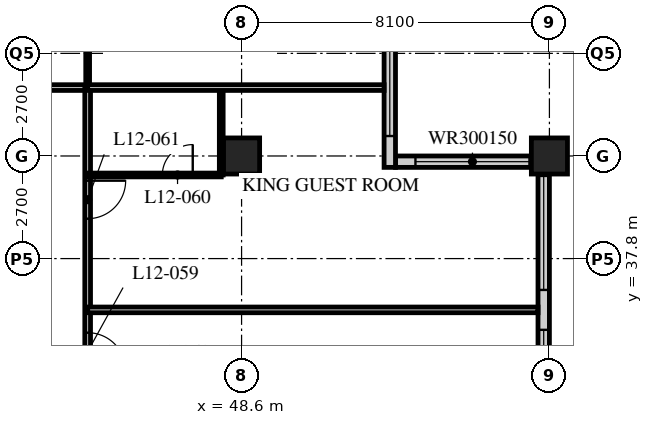
"""IFC4 building model, lengths in metres.
Left out: names, types, materials, properties, quantities, classifications, styles, units other than length and angle.
Written with IfcOpenShell. Run it as: python <this file> out.ifc"""

import sys

from ifc_helpers import new_model, si_unit, direction, frame, frame_2d, origin, origin_2d, place, context, subcontext, project, spatial, rectangle, hollow_rectangle, extrude, element, fill, save


model = new_model("IFC4")
c1 = context("Model", 3, precision=1e-05, world=origin(), true_north=direction((0.0, 1.0)))
c2 = subcontext(c1, "Body", "Model", "MODEL_VIEW")
j1 = project(units=[si_unit("LENGTHUNIT", "METRE"), si_unit("PLANEANGLEUNIT", "RADIAN")], contexts=[c1])
p1 = place(None, origin())
s1 = spatial("IfcSite", under=j1, at=p1, CompositionType="ELEMENT")
p2 = place(p1, origin())
s2 = spatial("IfcBuilding", under=s1, at=p2, CompositionType="ELEMENT")
p3 = place(p2, frame((0.0, 0.0, 53.4)))
s3 = spatial("IfcBuildingStorey", under=s2, at=p3, CompositionType="ELEMENT", Elevation=53.4)
for number, where, z_axis, x_axis in (
    (1, (48.6, 40.5, 0.0), (0.0, 0.0, 1.0), (1.0, 0.0, 0.0)),
    (2, (56.7, 40.5, 0.0), (0.0, 0.0, 1.0), (1.0, 0.0, 0.0)),
):
    element("IfcColumn", number, at=place(p3, frame(where, z_axis=z_axis, x_axis=x_axis)), inside=s3, PredefinedType="COLUMN", context=c2, shape_type="SweptSolid", body=[
        extrude(hollow_rectangle(XDim=0.95, YDim=0.95, WallThickness=0.095, at=origin_2d()), origin(), (0.0, 0.0, 1.0), 3.4),
    ])
p4 = place(p3, frame((56.55, 8.4, 0.0), z_axis=(0.0, 0.0, 1.0), x_axis=(0.0, 1.0, 0.0)))
e3 = element("IfcWall", 3, at=p4, inside=s3, PredefinedType="SOLIDWALL", context=c2, shape_type="SweptSolid", body=[
    extrude(rectangle(XDim=32.1, YDim=0.3, at=frame_2d((16.05, 0.0))), origin(), (0.0, 0.0, 1.0), 3.19),
])
p5 = place(p4, frame((0.225, 0.0, 0.9)))
e4 = element("IfcOpeningElement", 4, at=p5, cuts=e3, PredefinedType="OPENING", context=c2, shape_type="SweptSolid", body=[
    extrude(rectangle(XDim=3.0, YDim=2.0, at=frame_2d((1.5, 1.0))), frame((0.0, 0.16, 0.0), z_axis=(0.0, -1.0, 0.0), x_axis=(1.0, 0.0, 0.0)), (0.0, 0.0, 1.0), 0.32),
])
p6 = place(p4, frame((4.275, 0.0, 0.9)))
e5 = element("IfcOpeningElement", 5, at=p6, cuts=e3, PredefinedType="OPENING", context=c2, shape_type="SweptSolid", body=[
    extrude(rectangle(XDim=3.0, YDim=2.0, at=frame_2d((1.5, 1.0))), frame((0.0, 0.16, 0.0), z_axis=(0.0, -1.0, 0.0), x_axis=(1.0, 0.0, 0.0)), (0.0, 0.0, 1.0), 0.32),
])
p7 = place(p4, frame((8.325, 0.0, 0.9)))
e6 = element("IfcOpeningElement", 6, at=p7, cuts=e3, PredefinedType="OPENING", context=c2, shape_type="SweptSolid", body=[
    extrude(rectangle(XDim=3.0, YDim=2.0, at=frame_2d((1.5, 1.0))), frame((0.0, 0.16, 0.0), z_axis=(0.0, -1.0, 0.0), x_axis=(1.0, 0.0, 0.0)), (0.0, 0.0, 1.0), 0.32),
])
p8 = place(p4, frame((12.375, 0.0, 0.9)))
e7 = element("IfcOpeningElement", 7, at=p8, cuts=e3, PredefinedType="OPENING", context=c2, shape_type="SweptSolid", body=[
    extrude(rectangle(XDim=3.0, YDim=2.0, at=frame_2d((1.5, 1.0))), frame((0.0, 0.16, 0.0), z_axis=(0.0, -1.0, 0.0), x_axis=(1.0, 0.0, 0.0)), (0.0, 0.0, 1.0), 0.32),
])
p9 = place(p4, frame((16.425, 0.0, 0.9)))
e8 = element("IfcOpeningElement", 8, at=p9, cuts=e3, PredefinedType="OPENING", context=c2, shape_type="SweptSolid", body=[
    extrude(rectangle(XDim=3.0, YDim=2.0, at=frame_2d((1.5, 1.0))), frame((0.0, 0.16, 0.0), z_axis=(0.0, -1.0, 0.0), x_axis=(1.0, 0.0, 0.0)), (0.0, 0.0, 1.0), 0.32),
])
p10 = place(p4, frame((20.475, 0.0, 0.9)))
e9 = element("IfcOpeningElement", 9, at=p10, cuts=e3, PredefinedType="OPENING", context=c2, shape_type="SweptSolid", body=[
    extrude(rectangle(XDim=3.0, YDim=2.0, at=frame_2d((1.5, 1.0))), frame((0.0, 0.16, 0.0), z_axis=(0.0, -1.0, 0.0), x_axis=(1.0, 0.0, 0.0)), (0.0, 0.0, 1.0), 0.32),
])
p11 = place(p4, frame((24.525, 0.0, 0.9)))
e10 = element("IfcOpeningElement", 10, at=p11, cuts=e3, PredefinedType="OPENING", context=c2, shape_type="SweptSolid", body=[
    extrude(rectangle(XDim=3.0, YDim=2.0, at=frame_2d((1.5, 1.0))), frame((0.0, 0.16, 0.0), z_axis=(0.0, -1.0, 0.0), x_axis=(1.0, 0.0, 0.0)), (0.0, 0.0, 1.0), 0.32),
])
p12 = place(p4, frame((28.575, 0.0, 0.9)))
e11 = element("IfcOpeningElement", 11, at=p12, cuts=e3, PredefinedType="OPENING", context=c2, shape_type="SweptSolid", body=[
    extrude(rectangle(XDim=3.0, YDim=2.0, at=frame_2d((1.5, 1.0))), frame((0.0, 0.16, 0.0), z_axis=(0.0, -1.0, 0.0), x_axis=(1.0, 0.0, 0.0)), (0.0, 0.0, 1.0), 0.32),
])
p13 = place(p3, frame((56.4, 40.35, 0.0), z_axis=(0.0, 0.0, 1.0), x_axis=(-1.0, 0.0, 0.0)))
e12 = element("IfcWall", 12, at=p13, inside=s3, PredefinedType="SOLIDWALL", context=c2, shape_type="SweptSolid", body=[
    extrude(rectangle(XDim=3.75, YDim=0.3, at=frame_2d((1.875, 0.0))), origin(), (0.0, 0.0, 1.0), 3.19),
])
p14 = place(p13, frame((0.225, 0.0, 0.9)))
e13 = element("IfcOpeningElement", 13, at=p14, cuts=e12, PredefinedType="OPENING", context=c2, shape_type="SweptSolid", body=[
    extrude(rectangle(XDim=3.0, YDim=1.5, at=frame_2d((1.5, 0.75))), frame((0.0, 0.16, 0.0), z_axis=(0.0, -1.0, 0.0), x_axis=(1.0, 0.0, 0.0)), (0.0, 0.0, 1.0), 0.32),
])
p15 = place(p3, frame((52.5, 40.2, 0.0), z_axis=(0.0, 0.0, 1.0), x_axis=(0.0, 1.0, 0.0)))
e14 = element("IfcWall", 14, at=p15, inside=s3, PredefinedType="SOLIDWALL", context=c2, shape_type="SweptSolid", body=[
    extrude(rectangle(XDim=4.35, YDim=0.3, at=frame_2d((2.175, 0.0))), origin(), (0.0, 0.0, 1.0), 3.19),
])
p16 = place(p15, frame((0.825, 0.0, 0.9)))
e15 = element("IfcOpeningElement", 15, at=p16, cuts=e14, PredefinedType="OPENING", context=c2, shape_type="SweptSolid", body=[
    extrude(rectangle(XDim=3.0, YDim=1.5, at=frame_2d((1.5, 0.75))), frame((0.0, 0.16, 0.0), z_axis=(0.0, -1.0, 0.0), x_axis=(1.0, 0.0, 0.0)), (0.0, 0.0, 1.0), 0.32),
])
p17 = place(p3, frame((12.15, 42.3, 0.0), z_axis=(0.0, 0.0, 1.0), x_axis=(1.0, 0.0, 0.0)))
e16 = element("IfcWall", 16, at=p17, inside=s3, PredefinedType="PARTITIONING", context=c2, shape_type="SweptSolid", body=[
    extrude(rectangle(XDim=32.4, YDim=0.15, at=frame_2d((16.2, 0.0))), origin(), (0.0, 0.0, 1.0), 3.19),
])
p18 = place(p17, frame((6.5, 0.0, 0.0)))
e17 = element("IfcOpeningElement", 17, at=p18, cuts=e16, PredefinedType="OPENING", context=c2, shape_type="SweptSolid", body=[
    extrude(rectangle(XDim=1.0, YDim=2.1, at=frame_2d((0.5, 1.05))), frame((0.0, 0.085, 0.0), z_axis=(0.0, -1.0, 0.0), x_axis=(1.0, 0.0, 0.0)), (0.0, 0.0, 1.0), 0.17),
])
p19 = place(p17, frame((10.55, 0.0, 0.0)))
e18 = element("IfcOpeningElement", 18, at=p19, cuts=e16, PredefinedType="OPENING", context=c2, shape_type="SweptSolid", body=[
    extrude(rectangle(XDim=1.0, YDim=2.1, at=frame_2d((0.5, 1.05))), frame((0.0, 0.085, 0.0), z_axis=(0.0, -1.0, 0.0), x_axis=(1.0, 0.0, 0.0)), (0.0, 0.0, 1.0), 0.17),
])
p20 = place(p17, frame((14.6, 0.0, 0.0)))
e19 = element("IfcOpeningElement", 19, at=p20, cuts=e16, PredefinedType="OPENING", context=c2, shape_type="SweptSolid", body=[
    extrude(rectangle(XDim=1.0, YDim=2.1, at=frame_2d((0.5, 1.05))), frame((0.0, 0.085, 0.0), z_axis=(0.0, -1.0, 0.0), x_axis=(1.0, 0.0, 0.0)), (0.0, 0.0, 1.0), 0.17),
])
p21 = place(p17, frame((18.65, 0.0, 0.0)))
e20 = element("IfcOpeningElement", 20, at=p21, cuts=e16, PredefinedType="OPENING", context=c2, shape_type="SweptSolid", body=[
    extrude(rectangle(XDim=1.0, YDim=2.1, at=frame_2d((0.5, 1.05))), frame((0.0, 0.085, 0.0), z_axis=(0.0, -1.0, 0.0), x_axis=(1.0, 0.0, 0.0)), (0.0, 0.0, 1.0), 0.17),
])
p22 = place(p17, frame((22.7, 0.0, 0.0)))
e21 = element("IfcOpeningElement", 21, at=p22, cuts=e16, PredefinedType="OPENING", context=c2, shape_type="SweptSolid", body=[
    extrude(rectangle(XDim=1.0, YDim=2.1, at=frame_2d((0.5, 1.05))), frame((0.0, 0.085, 0.0), z_axis=(0.0, -1.0, 0.0), x_axis=(1.0, 0.0, 0.0)), (0.0, 0.0, 1.0), 0.17),
])
p23 = place(p17, frame((26.75, 0.0, 0.0)))
e22 = element("IfcOpeningElement", 22, at=p23, cuts=e16, PredefinedType="OPENING", context=c2, shape_type="SweptSolid", body=[
    extrude(rectangle(XDim=1.0, YDim=2.1, at=frame_2d((0.5, 1.05))), frame((0.0, 0.085, 0.0), z_axis=(0.0, -1.0, 0.0), x_axis=(1.0, 0.0, 0.0)), (0.0, 0.0, 1.0), 0.17),
])
p24 = place(p17, frame((28.775, 0.0, 0.0)))
e23 = element("IfcOpeningElement", 23, at=p24, cuts=e16, PredefinedType="OPENING", context=c2, shape_type="SweptSolid", body=[
    extrude(rectangle(XDim=1.0, YDim=2.1, at=frame_2d((0.5, 1.05))), frame((0.0, 0.085, 0.0), z_axis=(0.0, -1.0, 0.0), x_axis=(1.0, 0.0, 0.0)), (0.0, 0.0, 1.0), 0.17),
])
p25 = place(p17, frame((2.625, 0.0, 0.0)))
e24 = element("IfcOpeningElement", 24, at=p25, cuts=e16, PredefinedType="OPENING", context=c2, shape_type="SweptSolid", body=[
    extrude(rectangle(XDim=1.0, YDim=2.1, at=frame_2d((0.5, 1.05))), frame((0.0, 0.085, 0.0), z_axis=(0.0, -1.0, 0.0), x_axis=(1.0, 0.0, 0.0)), (0.0, 0.0, 1.0), 0.17),
])
p26 = place(p3, frame((44.55, 12.15, 0.0), z_axis=(0.0, 0.0, 1.0), x_axis=(0.0, 1.0, 0.0)))
e25 = element("IfcWall", 25, at=p26, inside=s3, PredefinedType="PARTITIONING", context=c2, shape_type="SweptSolid", body=[
    extrude(rectangle(XDim=30.15, YDim=0.15, at=frame_2d((15.075, 0.0))), origin(), (0.0, 0.0, 1.0), 3.19),
])
p27 = place(p26, frame((2.75, 0.0, 0.0)))
e26 = element("IfcOpeningElement", 26, at=p27, cuts=e25, PredefinedType="OPENING", context=c2, shape_type="SweptSolid", body=[
    extrude(rectangle(XDim=1.0, YDim=2.1, at=frame_2d((0.5, 1.05))), frame((0.0, 0.085, 0.0), z_axis=(0.0, -1.0, 0.0), x_axis=(1.0, 0.0, 0.0)), (0.0, 0.0, 1.0), 0.17),
])
p28 = place(p26, frame((6.5, 0.0, 0.0)))
e27 = element("IfcOpeningElement", 27, at=p28, cuts=e25, PredefinedType="OPENING", context=c2, shape_type="SweptSolid", body=[
    extrude(rectangle(XDim=1.0, YDim=2.1, at=frame_2d((0.5, 1.05))), frame((0.0, 0.085, 0.0), z_axis=(0.0, -1.0, 0.0), x_axis=(1.0, 0.0, 0.0)), (0.0, 0.0, 1.0), 0.17),
])
p29 = place(p26, frame((10.55, 0.0, 0.0)))
e28 = element("IfcOpeningElement", 28, at=p29, cuts=e25, PredefinedType="OPENING", context=c2, shape_type="SweptSolid", body=[
    extrude(rectangle(XDim=1.0, YDim=2.1, at=frame_2d((0.5, 1.05))), frame((0.0, 0.085, 0.0), z_axis=(0.0, -1.0, 0.0), x_axis=(1.0, 0.0, 0.0)), (0.0, 0.0, 1.0), 0.17),
])
p30 = place(p26, frame((14.6, 0.0, 0.0)))
e29 = element("IfcOpeningElement", 29, at=p30, cuts=e25, PredefinedType="OPENING", context=c2, shape_type="SweptSolid", body=[
    extrude(rectangle(XDim=1.0, YDim=2.1, at=frame_2d((0.5, 1.05))), frame((0.0, 0.085, 0.0), z_axis=(0.0, -1.0, 0.0), x_axis=(1.0, 0.0, 0.0)), (0.0, 0.0, 1.0), 0.17),
])
p31 = place(p26, frame((18.65, 0.0, 0.0)))
e30 = element("IfcOpeningElement", 30, at=p31, cuts=e25, PredefinedType="OPENING", context=c2, shape_type="SweptSolid", body=[
    extrude(rectangle(XDim=1.0, YDim=2.1, at=frame_2d((0.5, 1.05))), frame((0.0, 0.085, 0.0), z_axis=(0.0, -1.0, 0.0), x_axis=(1.0, 0.0, 0.0)), (0.0, 0.0, 1.0), 0.17),
])
p32 = place(p26, frame((22.7, 0.0, 0.0)))
e31 = element("IfcOpeningElement", 31, at=p32, cuts=e25, PredefinedType="OPENING", context=c2, shape_type="SweptSolid", body=[
    extrude(rectangle(XDim=1.0, YDim=2.1, at=frame_2d((0.5, 1.05))), frame((0.0, 0.085, 0.0), z_axis=(0.0, -1.0, 0.0), x_axis=(1.0, 0.0, 0.0)), (0.0, 0.0, 1.0), 0.17),
])
p33 = place(p26, frame((26.7, 0.0, 0.0)))
e32 = element("IfcOpeningElement", 32, at=p33, cuts=e25, PredefinedType="OPENING", context=c2, shape_type="SweptSolid", body=[
    extrude(rectangle(XDim=1.0, YDim=2.1, at=frame_2d((0.5, 1.05))), frame((0.0, 0.085, 0.0), z_axis=(0.0, -1.0, 0.0), x_axis=(1.0, 0.0, 0.0)), (0.0, 0.0, 1.0), 0.17),
])
p34 = place(p3, frame((44.55, 36.45, 0.0), z_axis=(0.0, 0.0, 1.0), x_axis=(1.0, 0.0, 0.0)))
e33 = element("IfcWall", 33, at=p34, inside=s3, PredefinedType="PARTITIONING", context=c2, shape_type="SweptSolid", body=[
    extrude(rectangle(XDim=11.85, YDim=0.15, at=frame_2d((5.925, 0.0))), origin(), (0.0, 0.0, 1.0), 3.19),
])
p35 = place(p3, frame((48.065, 40.0, 0.0), z_axis=(0.0, 0.0, 1.0), x_axis=(0.0, 1.0, 0.0)))
e34 = element("IfcWall", 34, at=p35, inside=s3, PredefinedType="PARTITIONING", context=c2, shape_type="SweptSolid", body=[
    extrude(rectangle(XDim=2.3, YDim=0.1, at=frame_2d((1.15, 0.0))), origin(), (0.0, 0.0, 1.0), 3.19),
])
p36 = place(p3, frame((44.55, 40.0, 0.0), z_axis=(0.0, 0.0, 1.0), x_axis=(1.0, 0.0, 0.0)))
e35 = element("IfcWall", 35, at=p36, inside=s3, PredefinedType="PARTITIONING", context=c2, shape_type="SweptSolid", body=[
    extrude(rectangle(XDim=3.515, YDim=0.1, at=frame_2d((1.757, 0.0))), origin(), (0.0, 0.0, 1.0), 3.19),
])
p37 = place(p36, frame((1.965, 0.0, 0.0)))
e36 = element("IfcOpeningElement", 36, at=p37, cuts=e35, PredefinedType="OPENING", context=c2, shape_type="SweptSolid", body=[
    extrude(rectangle(XDim=0.8, YDim=2.1, at=frame_2d((0.4, 1.05))), frame((0.0, 0.06, 0.0), z_axis=(0.0, -1.0, 0.0), x_axis=(1.0, 0.0, 0.0)), (0.0, 0.0, 1.0), 0.12),
])
p38 = place(p3, frame((44.55, 42.3, 0.0), z_axis=(0.0, 0.0, 1.0), x_axis=(0.0, 1.0, 0.0)))
e37 = element("IfcWall", 37, at=p38, inside=s3, PredefinedType="PARTITIONING", context=c2, shape_type="SweptSolid", body=[
    extrude(rectangle(XDim=2.4, YDim=0.1, at=frame_2d((1.2, 0.0))), origin(), (0.0, 0.0, 1.0), 3.19),
])
p39 = place(p3, frame((44.55, 42.3, 0.0), z_axis=(0.0, 0.0, 1.0), x_axis=(1.0, 0.0, 0.0)))
e38 = element("IfcWall", 38, at=p39, inside=s3, PredefinedType="PARTITIONING", context=c2, shape_type="SweptSolid", body=[
    extrude(rectangle(XDim=7.8, YDim=0.15, at=frame_2d((3.9, 0.0))), origin(), (0.0, 0.0, 1.0), 3.19),
])
p40 = place(p11, origin())
e39 = element("IfcWindow", 39, at=p40, inside=s3, PartitioningType="SINGLE_PANEL", PredefinedType="WINDOW", context=c2, shape_type="SweptSolid", body=[
    extrude(rectangle(XDim=3.0, YDim=2.0, at=frame_2d((1.5, 1.0))), frame((0.0, 0.03, 0.0), z_axis=(0.0, -1.0, 0.0), x_axis=(1.0, 0.0, 0.0)), (0.0, 0.0, 1.0), 0.06),
])
fill(e10, e39)
p41 = place(p12, origin())
e40 = element("IfcWindow", 40, at=p41, inside=s3, PartitioningType="SINGLE_PANEL", PredefinedType="WINDOW", context=c2, shape_type="SweptSolid", body=[
    extrude(rectangle(XDim=3.0, YDim=2.0, at=frame_2d((1.5, 1.0))), frame((0.0, 0.03, 0.0), z_axis=(0.0, -1.0, 0.0), x_axis=(1.0, 0.0, 0.0)), (0.0, 0.0, 1.0), 0.06),
])
fill(e11, e40)
p42 = place(p14, origin())
e41 = element("IfcWindow", 41, at=p42, inside=s3, PartitioningType="SINGLE_PANEL", PredefinedType="WINDOW", context=c2, shape_type="SweptSolid", body=[
    extrude(rectangle(XDim=3.0, YDim=1.5, at=frame_2d((1.5, 0.75))), frame((0.0, 0.03, 0.0), z_axis=(0.0, -1.0, 0.0), x_axis=(1.0, 0.0, 0.0)), (0.0, 0.0, 1.0), 0.06),
])
fill(e13, e41)
p43 = place(p16, origin())
e42 = element("IfcWindow", 42, at=p43, inside=s3, PartitioningType="SINGLE_PANEL", PredefinedType="WINDOW", context=c2, shape_type="SweptSolid", body=[
    extrude(rectangle(XDim=3.0, YDim=1.5, at=frame_2d((1.5, 0.75))), frame((0.0, 0.03, 0.0), z_axis=(0.0, -1.0, 0.0), x_axis=(1.0, 0.0, 0.0)), (0.0, 0.0, 1.0), 0.06),
])
fill(e15, e42)
p44 = place(p32, origin())
e43 = element("IfcDoor", 43, at=p44, inside=s3, OperationType="SINGLE_SWING_RIGHT", PredefinedType="DOOR", context=c2, shape_type="SweptSolid", body=[
    extrude(rectangle(XDim=1.0, YDim=2.1, at=frame_2d((0.5, 1.05))), frame((0.0, 0.025, 0.0), z_axis=(0.0, -1.0, 0.0), x_axis=(1.0, 0.0, 0.0)), (0.0, 0.0, 1.0), 0.05),
])
fill(e31, e43)
p45 = place(p37, origin())
e44 = element("IfcDoor", 44, at=p45, inside=s3, OperationType="SINGLE_SWING_RIGHT", PredefinedType="DOOR", context=c2, shape_type="SweptSolid", body=[
    extrude(rectangle(XDim=0.8, YDim=2.1, at=frame_2d((0.4, 1.05))), frame((0.0, 0.025, 0.0), z_axis=(0.0, -1.0, 0.0), x_axis=(1.0, 0.0, 0.0)), (0.0, 0.0, 1.0), 0.05),
])
fill(e36, e44)
p46 = place(p33, origin())
e45 = element("IfcDoor", 45, at=p46, inside=s3, OperationType="SINGLE_SWING_LEFT", PredefinedType="DOOR", context=c2, shape_type="SweptSolid", body=[
    extrude(rectangle(XDim=1.0, YDim=2.1, at=frame_2d((0.5, 1.05))), frame((0.0, 0.025, 0.0), z_axis=(0.0, -1.0, 0.0), x_axis=(1.0, 0.0, 0.0)), (0.0, 0.0, 1.0), 0.05),
])
fill(e32, e45)
save(model, sys.argv[1])
